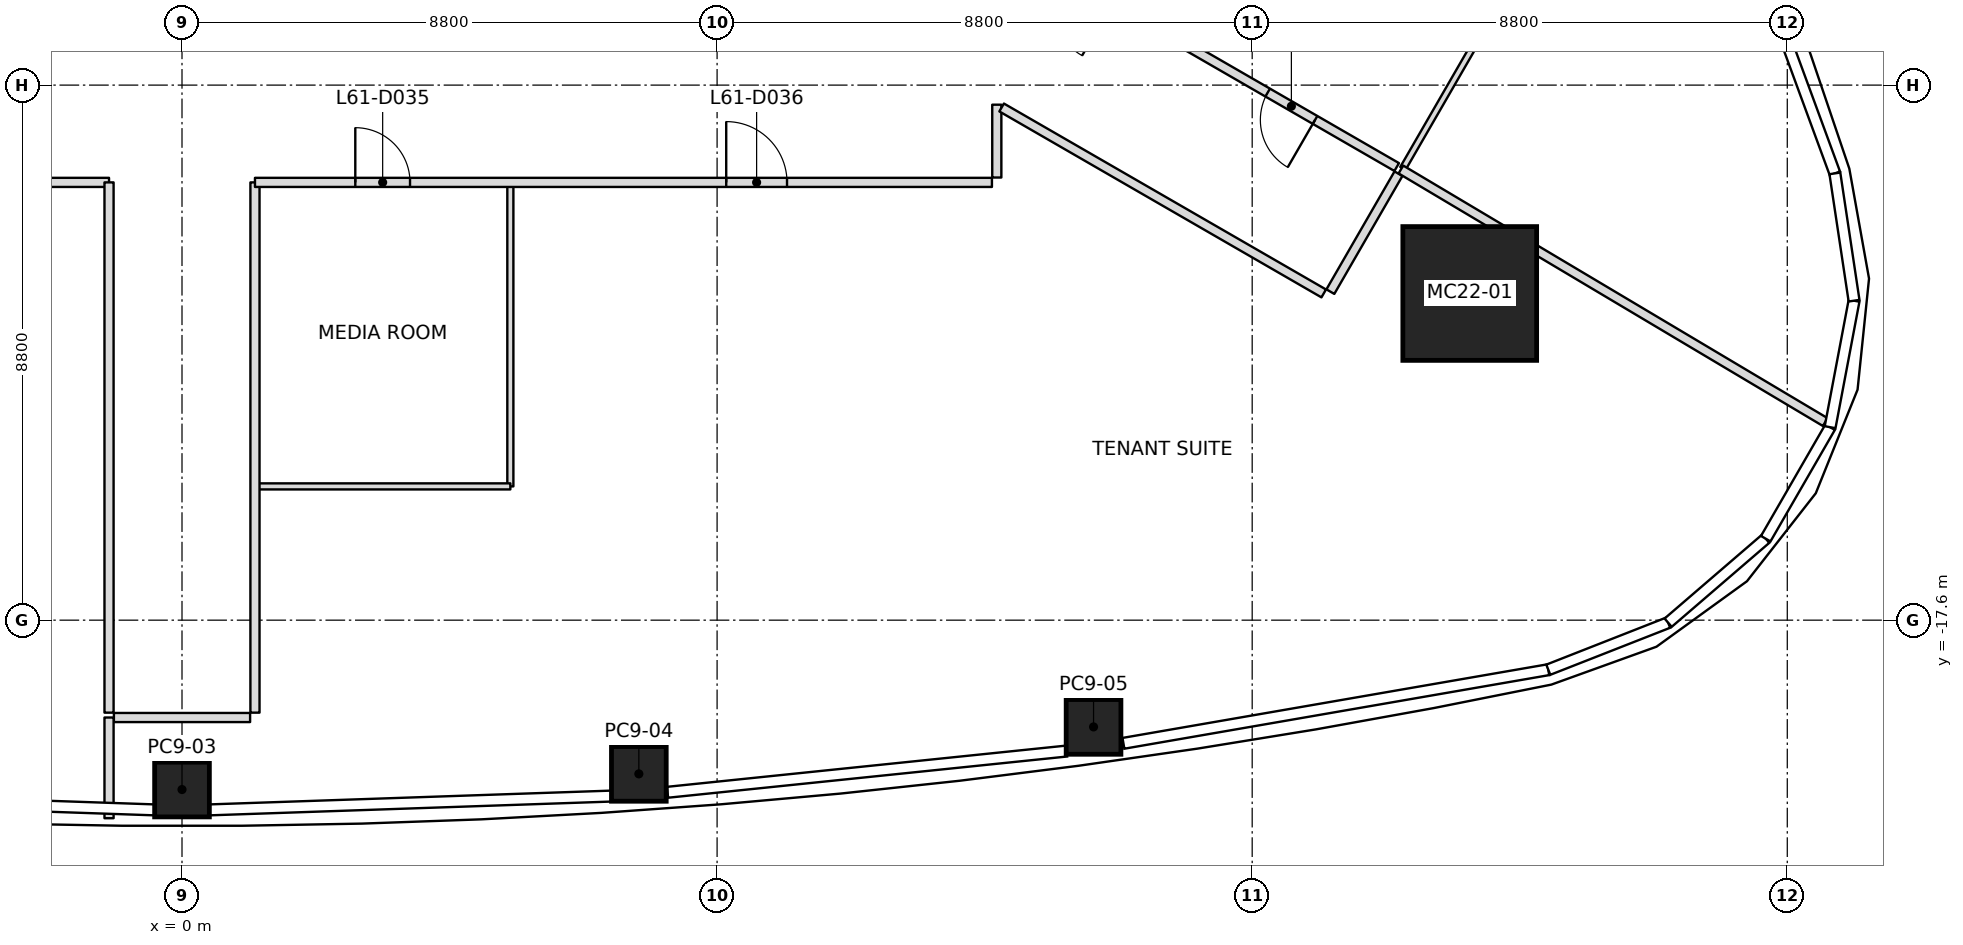
"""IFC4 building model, lengths in metres.
Left out: names, types, materials, properties, quantities, classifications, styles, units other than length and angle.
Written with IfcOpenShell. Run it as: python <this file> out.ifc"""

import sys

from ifc_helpers import new_model, si_unit, direction, frame, frame_2d, origin, origin_2d, place, context, subcontext, project, spatial, rectangle, extrude, element, fill, save


model = new_model("IFC4")
c1 = context("Model", 3, precision=1e-05, world=origin(), true_north=direction((0.0, 1.0)))
c2 = subcontext(c1, "Body", "Model", "MODEL_VIEW")
j1 = project(units=[si_unit("LENGTHUNIT", "METRE"), si_unit("PLANEANGLEUNIT", "RADIAN")], contexts=[c1])
p1 = place(None, origin())
s1 = spatial("IfcSite", under=j1, at=p1, CompositionType="ELEMENT")
p2 = place(p1, origin())
s2 = spatial("IfcBuilding", under=s1, at=p2, CompositionType="ELEMENT")
p3 = place(p2, frame((0.0, 0.0, 271.0)))
s3 = spatial("IfcBuildingStorey", under=s2, at=p3, CompositionType="ELEMENT", Elevation=271.0)
p4 = place(p3, frame((21.178, -12.227, 0.0), z_axis=(-0.027817676907, 0.016043967164, 0.999484250986), x_axis=(0.999613013546, 0.000446478676, 0.027814093645)))
e1 = element("IfcColumn", 1, at=p4, inside=s3, PredefinedType="COLUMN", context=c2, shape_type="SweptSolid", body=[
    extrude(rectangle(XDim=2.2, YDim=2.2, at=origin_2d()), origin(), (0.0, 0.0, 1.0), 4.002),
])
p5 = place(p3, frame((0.0, -20.386, 0.0), z_axis=(0.0, 0.01141283087, 0.999934871525), x_axis=(1.0, 0.0, 0.0)))
e2 = element("IfcColumn", 2, at=p5, inside=s3, PredefinedType="COLUMN", context=c2, shape_type="SweptSolid", body=[
    extrude(rectangle(XDim=0.9, YDim=0.9, at=origin_2d()), origin(), (0.0, 0.0, 1.0), 4.0),
])
p6 = place(p3, frame((7.513, -20.128, 0.0), z_axis=(-0.008727150594, 0.011168311599, 0.999899547784), x_axis=(0.997609340285, 0.068648045821, 0.007940401811)))
e3 = element("IfcColumn", 3, at=p6, inside=s3, PredefinedType="COLUMN", context=c2, shape_type="SweptSolid", body=[
    extrude(rectangle(XDim=0.9, YDim=0.9, at=origin_2d()), origin(), (0.0, 0.0, 1.0), 4.0),
])
p7 = place(p3, frame((14.991, -19.356, 0.0), z_axis=(-0.017452445502, 0.010434853779, 0.999793241612), x_axis=(0.990449528145, 0.136960564895, 0.015859882108)))
e4 = element("IfcColumn", 4, at=p7, inside=s3, PredefinedType="COLUMN", context=c2, shape_type="SweptSolid", body=[
    extrude(rectangle(XDim=0.9, YDim=0.9, at=origin_2d()), origin(), (0.0, 0.0, 1.0), 4.001),
])
p8 = place(p3, frame((-1.2, -19.201, 0.0), z_axis=(0.0, 0.0, 1.0), x_axis=(0.0, -1.0, 0.0)))
e5 = element("IfcWall", 5, at=p8, inside=s3, PredefinedType="PARTITIONING", context=c2, shape_type="SweptSolid", body=[
    extrude(rectangle(XDim=1.656, YDim=0.15, at=frame_2d((0.828, 0.0))), origin(), (0.0, 0.0, 1.0), 3.234),
])
p9 = place(p3, frame((20.046, -10.188, 0.0), z_axis=(0.0, 0.0, 1.0), x_axis=(0.859283446729, -0.511499714739, 0.0)))
e6 = element("IfcWall", 6, at=p9, inside=s3, PredefinedType="PARTITIONING", context=c2, shape_type="SweptSolid", body=[
    extrude(rectangle(XDim=8.121, YDim=0.15, at=frame_2d((4.061, 0.0))), origin(), (0.0, 0.0, 1.0), 3.084),
])
p10 = place(p3, frame((-13.32, -10.4, 0.0), z_axis=(0.0, 0.0, 1.0), x_axis=(1.0, 0.0, 0.0)))
e7 = element("IfcWall", 7, at=p10, inside=s3, PredefinedType="PARTITIONING", context=c2, shape_type="SweptSolid", body=[
    extrude(rectangle(XDim=12.12, YDim=0.15, at=frame_2d((6.06, 0.0))), origin(), (0.0, 0.0, 1.0), 3.3),
])
p11 = place(p10, frame((1.27, 0.0, 0.0)))
e8 = element("IfcOpeningElement", 8, at=p11, cuts=e7, PredefinedType="OPENING", context=c2, shape_type="SweptSolid", body=[
    extrude(rectangle(XDim=0.9, YDim=2.1, at=frame_2d((0.45, 1.05))), frame((0.0, 0.075, 0.0), z_axis=(0.0, -1.0, 0.0), x_axis=(1.0, 0.0, 0.0)), (0.0, 0.0, 1.0), 0.15),
])
p12 = place(p10, frame((7.37, 0.0, 0.0)))
e9 = element("IfcOpeningElement", 9, at=p12, cuts=e7, PredefinedType="OPENING", context=c2, shape_type="SweptSolid", body=[
    extrude(rectangle(XDim=1.0, YDim=2.1, at=frame_2d((0.5, 1.05))), frame((0.0, 0.075, 0.0), z_axis=(0.0, -1.0, 0.0), x_axis=(1.0, 0.0, 0.0)), (0.0, 0.0, 1.0), 0.15),
])
p13 = place(p3, frame((-1.2, -10.4, 0.0), z_axis=(0.0, 0.0, 1.0), x_axis=(0.0, -1.0, 0.0)))
e10 = element("IfcWall", 10, at=p13, inside=s3, PredefinedType="PARTITIONING", context=c2, shape_type="SweptSolid", body=[
    extrude(rectangle(XDim=8.721, YDim=0.15, at=frame_2d((4.361, 0.0))), origin(), (0.0, 0.0, 1.0), 3.3),
])
p14 = place(p3, frame((-1.12, -19.201, 0.0), z_axis=(0.0, 0.0, 1.0), x_axis=(1.0, 0.0, 0.0)))
e11 = element("IfcWall", 11, at=p14, inside=s3, PredefinedType="PARTITIONING", context=c2, shape_type="SweptSolid", body=[
    extrude(rectangle(XDim=2.24, YDim=0.15, at=frame_2d((1.12, 0.0))), origin(), (0.0, 0.0, 1.0), 3.3),
])
p15 = place(p3, frame((1.2, -19.121, 0.0), z_axis=(0.0, 0.0, 1.0), x_axis=(0.0, 1.0, 0.0)))
e12 = element("IfcWall", 12, at=p15, inside=s3, PredefinedType="PARTITIONING", context=c2, shape_type="SweptSolid", body=[
    extrude(rectangle(XDim=8.721, YDim=0.15, at=frame_2d((4.361, 0.0))), origin(), (0.0, 0.0, 1.0), 3.3),
])
p16 = place(p3, frame((1.2, -10.4, 0.0), z_axis=(0.0, 0.0, 1.0), x_axis=(1.0, 0.0, 0.0)))
e13 = element("IfcWall", 13, at=p16, inside=s3, PredefinedType="PARTITIONING", context=c2, shape_type="SweptSolid", body=[
    extrude(rectangle(XDim=12.12, YDim=0.15, at=frame_2d((6.06, 0.0))), origin(), (0.0, 0.0, 1.0), 3.243),
])
p17 = place(p16, frame((1.65, 0.0, 0.0)))
e14 = element("IfcOpeningElement", 14, at=p17, cuts=e13, PredefinedType="OPENING", context=c2, shape_type="SweptSolid", body=[
    extrude(rectangle(XDim=0.9, YDim=2.1, at=frame_2d((0.45, 1.05))), frame((0.0, 0.075, 0.0), z_axis=(0.0, -1.0, 0.0), x_axis=(1.0, 0.0, 0.0)), (0.0, 0.0, 1.0), 0.15),
])
p18 = place(p16, frame((7.75, 0.0, 0.0)))
e15 = element("IfcOpeningElement", 15, at=p18, cuts=e13, PredefinedType="OPENING", context=c2, shape_type="SweptSolid", body=[
    extrude(rectangle(XDim=1.0, YDim=2.1, at=frame_2d((0.5, 1.05))), frame((0.0, 0.075, 0.0), z_axis=(0.0, -1.0, 0.0), x_axis=(1.0, 0.0, 0.0)), (0.0, 0.0, 1.0), 0.15),
])
p19 = place(p3, frame((13.4, -10.32, 0.0), z_axis=(0.0, 0.0, 1.0), x_axis=(0.0, 1.0, 0.0)))
e16 = element("IfcWall", 16, at=p19, inside=s3, PredefinedType="PARTITIONING", context=c2, shape_type="SweptSolid", body=[
    extrude(rectangle(XDim=1.198, YDim=0.15, at=frame_2d((0.599, 0.0))), origin(), (0.0, 0.0, 1.0), 3.233),
])
p20 = place(p3, frame((13.479, -9.168, 0.0), z_axis=(0.0, 0.0, 1.0), x_axis=(0.866031386012, -0.499989638334, 0.0)))
e17 = element("IfcWall", 17, at=p20, inside=s3, PredefinedType="PARTITIONING", context=c2, shape_type="SweptSolid", body=[
    extrude(rectangle(XDim=6.117, YDim=0.15, at=frame_2d((3.059, 0.0))), origin(), (0.0, 0.0, 1.0), 3.233),
])
p21 = place(p3, frame((19.977, -10.148, 0.0), z_axis=(0.0, 0.0, 1.0), x_axis=(-0.866034613097, 0.499984048663, 0.0)))
e18 = element("IfcWall", 18, at=p21, inside=s3, PredefinedType="PARTITIONING", context=c2, shape_type="SweptSolid", body=[
    extrude(rectangle(XDim=7.594, YDim=0.15, at=frame_2d((3.797, 0.0))), origin(), (0.0, 0.0, 1.0), 3.167),
])
p22 = place(p21, frame((1.55, 0.0, 0.0)))
e19 = element("IfcOpeningElement", 19, at=p22, cuts=e18, PredefinedType="OPENING", context=c2, shape_type="SweptSolid", body=[
    extrude(rectangle(XDim=0.9, YDim=2.1, at=frame_2d((0.45, 1.05))), frame((0.0, 0.075, 0.0), z_axis=(0.0, -1.0, 0.0), x_axis=(1.0, 0.0, 0.0)), (0.0, 0.0, 1.0), 0.15),
])
p23 = place(p21, frame((5.397, 0.0, 0.0)))
e20 = element("IfcOpeningElement", 20, at=p23, cuts=e18, PredefinedType="OPENING", context=c2, shape_type="SweptSolid", body=[
    extrude(rectangle(XDim=1.0, YDim=2.1, at=frame_2d((0.5, 1.05))), frame((0.0, 0.075, 0.0), z_axis=(0.0, -1.0, 0.0), x_axis=(1.0, 0.0, 0.0)), (0.0, 0.0, 1.0), 0.15),
])
p24 = place(p3, frame((18.886, -12.197, 0.0), z_axis=(0.0, 0.0, 1.0), x_axis=(0.500030632641, 0.866007717299, 0.0)))
e21 = element("IfcWall", 21, at=p24, inside=s3, PredefinedType="PARTITIONING", context=c2, shape_type="SweptSolid", body=[
    extrude(rectangle(XDim=2.24, YDim=0.15, at=frame_2d((1.12, 0.0))), origin(), (0.0, 0.0, 1.0), 3.233),
])
p25 = place(p3, frame((5.4, -10.43, 0.0), z_axis=(0.0, 0.0, 1.0), x_axis=(0.0, -1.0, 0.0)))
e22 = element("IfcWall", 22, at=p25, inside=s3, PredefinedType="PARTITIONING", context=c2, shape_type="SweptSolid", body=[
    extrude(rectangle(XDim=4.97, YDim=0.1, at=frame_2d((2.485, 0.0))), origin(), (0.0, 0.0, 1.0), 3.3),
])
p26 = place(p3, frame((5.4, -15.4, 0.0), z_axis=(0.0, 0.0, 1.0), x_axis=(-1.0, 0.0, 0.0)))
e23 = element("IfcWall", 23, at=p26, inside=s3, PredefinedType="PARTITIONING", context=c2, shape_type="SweptSolid", body=[
    extrude(rectangle(XDim=4.17, YDim=0.1, at=frame_2d((2.085, 0.0))), origin(), (0.0, 0.0, 1.0), 3.3),
])
p27 = place(p3, frame((22.563, -5.868, 0.0), z_axis=(0.0, 0.0, 1.0), x_axis=(-0.500011595943, -0.86601870876, 0.0)))
e24 = element("IfcWall", 24, at=p27, inside=s3, PredefinedType="PARTITIONING", context=c2, shape_type="SweptSolid", body=[
    extrude(rectangle(XDim=4.97, YDim=0.1, at=frame_2d((2.485, 0.0))), origin(), (0.0, 0.0, 1.0), 3.3),
])
p28 = place(p17, origin())
e25 = element("IfcDoor", 25, at=p28, inside=s3, OperationType="SINGLE_SWING_RIGHT", PredefinedType="DOOR", context=c2, shape_type="SweptSolid", body=[
    extrude(rectangle(XDim=0.9, YDim=2.1, at=frame_2d((0.45, 1.05))), frame((0.0, 0.025, 0.0), z_axis=(0.0, -1.0, 0.0), x_axis=(1.0, 0.0, 0.0)), (0.0, 0.0, 1.0), 0.05),
])
fill(e14, e25)
p29 = place(p18, origin())
e26 = element("IfcDoor", 26, at=p29, inside=s3, OperationType="SINGLE_SWING_RIGHT", PredefinedType="DOOR", context=c2, shape_type="SweptSolid", body=[
    extrude(rectangle(XDim=1.0, YDim=2.1, at=frame_2d((0.5, 1.05))), frame((0.0, 0.025, 0.0), z_axis=(0.0, -1.0, 0.0), x_axis=(1.0, 0.0, 0.0)), (0.0, 0.0, 1.0), 0.05),
])
fill(e15, e26)
p30 = place(p22, origin())
e27 = element("IfcDoor", 27, at=p30, inside=s3, OperationType="SINGLE_SWING_RIGHT", PredefinedType="DOOR", context=c2, shape_type="SweptSolid", body=[
    extrude(rectangle(XDim=0.9, YDim=2.1, at=frame_2d((0.45, 1.05))), frame((0.0, 0.025, 0.0), z_axis=(0.0, -1.0, 0.0), x_axis=(1.0, 0.0, 0.0)), (0.0, 0.0, 1.0), 0.05),
])
fill(e19, e27)
save(model, sys.argv[1])
